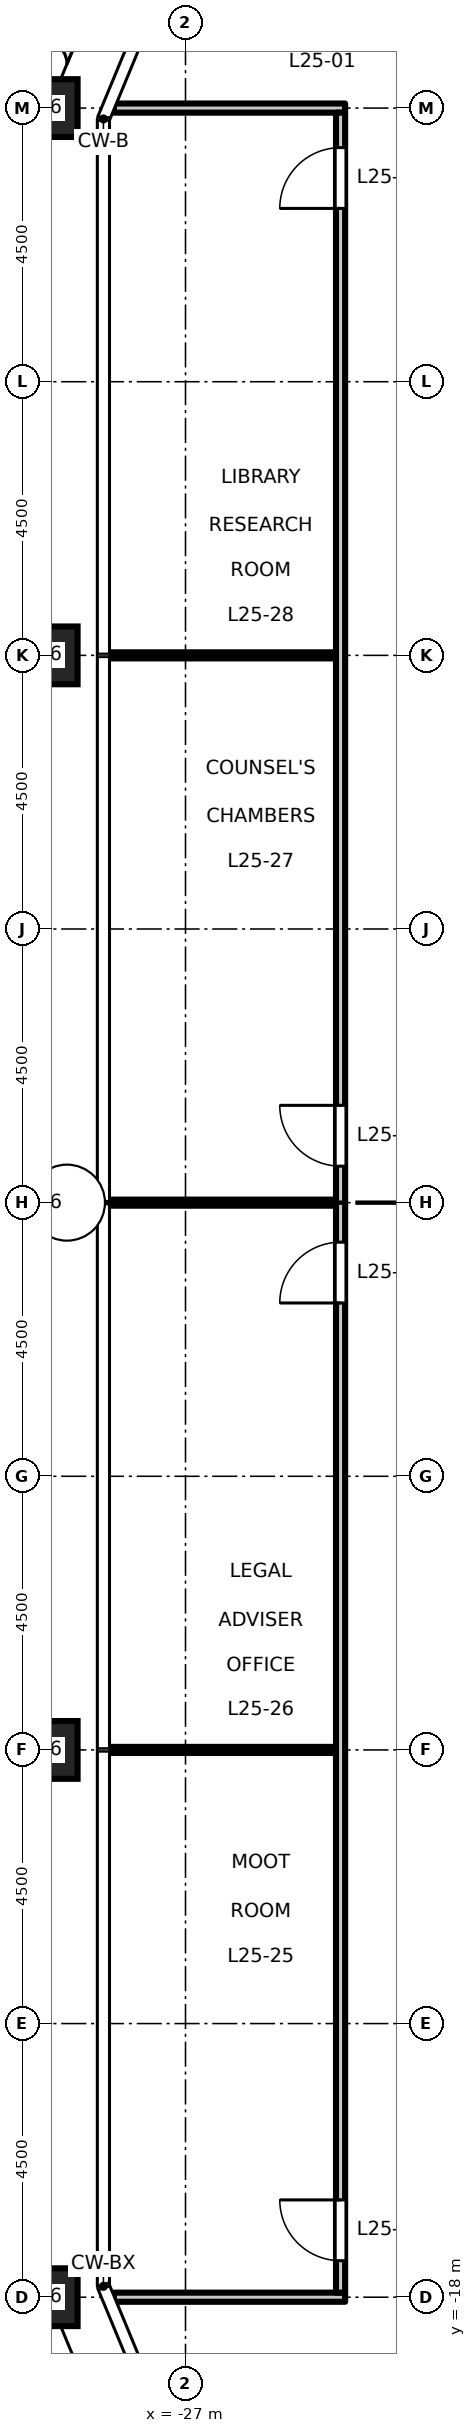
"""IFC4 building model, lengths in metres.
Left out: names, types, materials, properties, quantities, classifications, styles, units other than length and angle.
Written with IfcOpenShell. Run it as: python <this file> out.ifc"""

import sys

from ifc_helpers import new_model, si_unit, direction, frame, frame_2d, origin, origin_2d, place, context, subcontext, project, spatial, rectangle, hollow_rectangle, extrude, element, fill, save


model = new_model("IFC4")
c1 = context("Model", 3, precision=1e-05, world=origin(), true_north=direction((0.0, 1.0)))
c2 = subcontext(c1, "Body", "Model", "MODEL_VIEW")
j1 = project(units=[si_unit("LENGTHUNIT", "METRE"), si_unit("PLANEANGLEUNIT", "RADIAN")], contexts=[c1])
p1 = place(None, origin())
s1 = spatial("IfcSite", under=j1, at=p1, CompositionType="ELEMENT")
p2 = place(p1, origin())
s2 = spatial("IfcBuilding", under=s1, at=p2, CompositionType="ELEMENT")
p3 = place(p2, frame((0.0, 0.0, 118.2)))
s3 = spatial("IfcBuildingStorey", under=s2, at=p3, CompositionType="ELEMENT", Elevation=118.2)
for number, where, z_axis, x_axis in (
    (1, (-29.25, 18.0, 0.0), (0.0, 0.0, 1.0), (1.0, 0.0, 0.0)),
    (2, (-29.25, 9.0, 0.0), (0.0, 0.0, 1.0), (1.0, 0.0, 0.0)),
    (3, (-29.25, 0.0, 0.0), (0.0, 0.0, 1.0), (1.0, 0.0, 0.0)),
    (4, (-29.25, -9.0, 0.0), (0.0, 0.0, 1.0), (1.0, 0.0, 0.0)),
    (5, (-29.25, -18.0, 0.0), (0.0, 0.0, 1.0), (1.0, 0.0, 0.0)),
):
    element("IfcColumn", number, at=place(p3, frame(where, z_axis=z_axis, x_axis=x_axis)), inside=s3, PredefinedType="COLUMN", context=c2, shape_type="SweptSolid", body=[
        extrude(hollow_rectangle(XDim=0.95, YDim=0.95, WallThickness=0.055, at=origin_2d()), origin(), (0.0, 0.0, 1.0), 4.5),
    ])
p4 = place(p3, frame((-28.178, -18.0, 0.0), z_axis=(0.0, 0.0, 1.0), x_axis=(1.0, 0.0, 0.0)))
e6 = element("IfcWall", 6, at=p4, inside=s3, PredefinedType="PARTITIONING", context=c2, shape_type="SweptSolid", body=[
    extrude(rectangle(XDim=3.803, YDim=0.15, at=frame_2d((1.901, 0.0))), origin(), (0.0, 0.0, 1.0), 4.35),
])
for number, where, z_axis, x_axis in (
    (7, (-28.26, -9.0, 0.0), (0.0, 0.0, 1.0), (1.0, 0.0, 0.0)),
    (8, (-28.26, 0.0, 0.0), (0.0, 0.0, 1.0), (1.0, 0.0, 0.0)),
    (9, (-28.26, 9.0, 0.0), (0.0, 0.0, 1.0), (1.0, 0.0, 0.0)),
):
    element("IfcWall", number, at=place(p3, frame(where, z_axis=z_axis, x_axis=x_axis)), inside=s3, PredefinedType="PARTITIONING", context=c2, shape_type="SweptSolid", body=[
        extrude(rectangle(XDim=3.735, YDim=0.1, at=frame_2d((1.868, 0.0))), origin(), (0.0, 0.0, 1.0), 4.35),
    ])
p5 = place(p3, frame((-28.178, 18.0, 0.0), z_axis=(0.0, 0.0, 1.0), x_axis=(1.0, 0.0, 0.0)))
e10 = element("IfcWall", 10, at=p5, inside=s3, PredefinedType="PARTITIONING", context=c2, shape_type="SweptSolid", body=[
    extrude(rectangle(XDim=3.803, YDim=0.15, at=frame_2d((1.901, 0.0))), origin(), (0.0, 0.0, 1.0), 4.35),
])
p6 = place(p3, frame((-24.45, -17.925, 0.0), z_axis=(0.0, 0.0, 1.0), x_axis=(0.0, 1.0, 0.0)))
e11 = element("IfcWall", 11, at=p6, inside=s3, PredefinedType="PARTITIONING", context=c2, shape_type="SweptSolid", body=[
    extrude(rectangle(XDim=35.85, YDim=0.15, at=frame_2d((17.925, 0.0))), origin(), (0.0, 0.0, 1.0), 4.35),
])
p7 = place(p6, frame((0.525, 0.0, 0.0)))
e12 = element("IfcOpeningElement", 12, at=p7, cuts=e11, PredefinedType="OPENING", context=c2, shape_type="SweptSolid", body=[
    extrude(rectangle(XDim=1.0, YDim=2.1, at=frame_2d((0.5, 1.05))), frame((0.0, 0.085, 0.0), z_axis=(0.0, -1.0, 0.0), x_axis=(1.0, 0.0, 0.0)), (0.0, 0.0, 1.0), 0.17),
])
p8 = place(p6, frame((16.275, 0.0, 0.0)))
e13 = element("IfcOpeningElement", 13, at=p8, cuts=e11, PredefinedType="OPENING", context=c2, shape_type="SweptSolid", body=[
    extrude(rectangle(XDim=1.0, YDim=2.1, at=frame_2d((0.5, 1.05))), frame((0.0, 0.085, 0.0), z_axis=(0.0, -1.0, 0.0), x_axis=(1.0, 0.0, 0.0)), (0.0, 0.0, 1.0), 0.17),
])
p9 = place(p6, frame((18.525, 0.0, 0.0)))
e14 = element("IfcOpeningElement", 14, at=p9, cuts=e11, PredefinedType="OPENING", context=c2, shape_type="SweptSolid", body=[
    extrude(rectangle(XDim=1.0, YDim=2.1, at=frame_2d((0.5, 1.05))), frame((0.0, 0.085, 0.0), z_axis=(0.0, -1.0, 0.0), x_axis=(1.0, 0.0, 0.0)), (0.0, 0.0, 1.0), 0.17),
])
p10 = place(p6, frame((34.275, 0.0, 0.0)))
e15 = element("IfcOpeningElement", 15, at=p10, cuts=e11, PredefinedType="OPENING", context=c2, shape_type="SweptSolid", body=[
    extrude(rectangle(XDim=1.0, YDim=2.1, at=frame_2d((0.5, 1.05))), frame((0.0, 0.085, 0.0), z_axis=(0.0, -1.0, 0.0), x_axis=(1.0, 0.0, 0.0)), (0.0, 0.0, 1.0), 0.17),
])
p11 = place(p7, origin())
e16 = element("IfcDoor", 16, at=p11, inside=s3, OperationType="SINGLE_SWING_RIGHT", PredefinedType="DOOR", context=c2, shape_type="SweptSolid", body=[
    extrude(rectangle(XDim=1.0, YDim=2.1, at=frame_2d((0.5, 1.05))), frame((0.0, 0.025, 0.0), z_axis=(0.0, -1.0, 0.0), x_axis=(1.0, 0.0, 0.0)), (0.0, 0.0, 1.0), 0.05),
])
fill(e12, e16)
p12 = place(p8, origin())
e17 = element("IfcDoor", 17, at=p12, inside=s3, OperationType="SINGLE_SWING_LEFT", PredefinedType="DOOR", context=c2, shape_type="SweptSolid", body=[
    extrude(rectangle(XDim=1.0, YDim=2.1, at=frame_2d((0.5, 1.05))), frame((0.0, 0.025, 0.0), z_axis=(0.0, -1.0, 0.0), x_axis=(1.0, 0.0, 0.0)), (0.0, 0.0, 1.0), 0.05),
])
fill(e13, e17)
p13 = place(p9, origin())
e18 = element("IfcDoor", 18, at=p13, inside=s3, OperationType="SINGLE_SWING_RIGHT", PredefinedType="DOOR", context=c2, shape_type="SweptSolid", body=[
    extrude(rectangle(XDim=1.0, YDim=2.1, at=frame_2d((0.5, 1.05))), frame((0.0, 0.025, 0.0), z_axis=(0.0, -1.0, 0.0), x_axis=(1.0, 0.0, 0.0)), (0.0, 0.0, 1.0), 0.05),
])
fill(e14, e18)
p14 = place(p10, origin())
e19 = element("IfcDoor", 19, at=p14, inside=s3, OperationType="SINGLE_SWING_LEFT", PredefinedType="DOOR", context=c2, shape_type="SweptSolid", body=[
    extrude(rectangle(XDim=1.0, YDim=2.1, at=frame_2d((0.5, 1.05))), frame((0.0, 0.025, 0.0), z_axis=(0.0, -1.0, 0.0), x_axis=(1.0, 0.0, 0.0)), (0.0, 0.0, 1.0), 0.05),
])
fill(e15, e19)
save(model, sys.argv[1])
